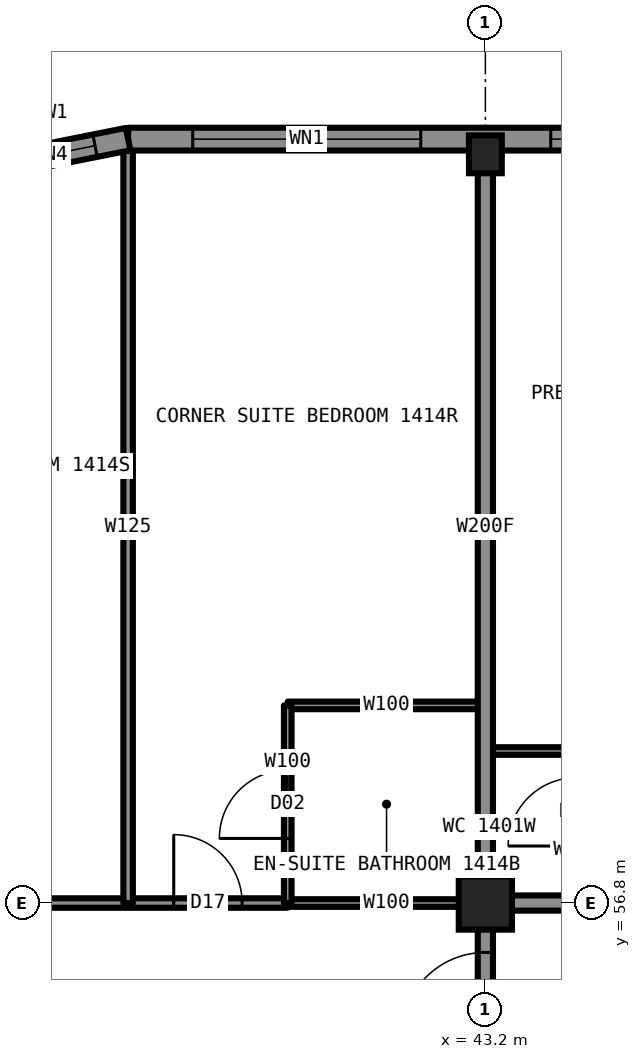
"""IFC4 building model, lengths in metres.
Left out: names, types, materials, properties, quantities, classifications, styles, units other than length and angle.
Written with IfcOpenShell. Run it as: python <this file> out.ifc"""

import sys

from ifc_helpers import new_model, si_unit, direction, frame, frame_2d, origin, origin_2d, place, context, subcontext, project, spatial, rectangle, hollow_rectangle, i_section, extrude, element, fill, save


model = new_model("IFC4")
c1 = context("Model", 3, precision=1e-05, world=origin(), true_north=direction((0.0, 1.0)))
c2 = subcontext(c1, "Body", "Model", "MODEL_VIEW")
j1 = project(units=[si_unit("LENGTHUNIT", "METRE"), si_unit("PLANEANGLEUNIT", "RADIAN")], contexts=[c1])
p1 = place(None, origin())
s1 = spatial("IfcSite", under=j1, at=p1, CompositionType="ELEMENT")
p2 = place(p1, origin())
s2 = spatial("IfcBuilding", under=s1, at=p2, CompositionType="ELEMENT")
p3 = place(p2, frame((0.0, 0.0, 49.5)))
s3 = spatial("IfcBuildingStorey", under=s2, at=p3, CompositionType="ELEMENT", Elevation=49.5)
p4 = place(p3, frame((43.2, 66.65, 0.0), z_axis=(0.0, 0.0, 1.0), x_axis=(1.0, 0.0, 0.0)))
e1 = element("IfcColumn", 1, at=p4, inside=s3, PredefinedType="COLUMN", context=c2, shape_type="SweptSolid", body=[
    extrude(i_section(OverallWidth=0.432, OverallDepth=0.498, WebThickness=0.056, FlangeThickness=0.089, at=origin_2d()), origin(), (0.0, 0.0, 1.0), 3.5),
])
p5 = place(p3, frame((43.2, 56.8, 0.0), z_axis=(0.0, 0.0, 1.0), x_axis=(1.0, 0.0, 0.0)))
e2 = element("IfcColumn", 2, at=p5, inside=s3, PredefinedType="COLUMN", context=c2, shape_type="SweptSolid", body=[
    extrude(hollow_rectangle(XDim=0.7, YDim=0.7, WallThickness=0.06, at=origin_2d()), origin(), (0.0, 0.0, 1.0), 3.5),
])
p6 = place(p3, frame((40.6, 56.8, 0.0), z_axis=(0.0, 0.0, 1.0), x_axis=(1.0, 0.0, 0.0)))
e3 = element("IfcWall", 3, at=p6, inside=s3, PredefinedType="PARTITIONING", context=c2, shape_type="SweptSolid", body=[
    extrude(rectangle(XDim=2.6, YDim=0.1, at=frame_2d((1.3, 0.0))), origin(), (0.0, 0.0, 1.0), 2.573),
])
p7 = place(p3, frame((43.2, 56.8, 0.0), z_axis=(0.0, 0.0, 1.0), x_axis=(1.0, 0.0, 0.0)))
e4 = element("IfcWall", 4, at=p7, inside=s3, PredefinedType="PARTITIONING", context=c2, shape_type="SweptSolid", body=[
    extrude(rectangle(XDim=23.6, YDim=0.2, at=frame_2d((11.8, 0.0))), origin(), (0.0, 0.0, 1.0), 3.33),
])
p8 = place(p7, frame((1.46, 0.0, 0.0)))
e5 = element("IfcOpeningElement", 5, at=p8, cuts=e4, PredefinedType="OPENING", context=c2, shape_type="SweptSolid", body=[
    extrude(rectangle(XDim=1.0, YDim=2.2, at=frame_2d((0.5, 1.1))), frame((0.0, 0.11, 0.0), z_axis=(0.0, -1.0, 0.0), x_axis=(1.0, 0.0, 0.0)), (0.0, 0.0, 1.0), 0.22),
])
p9 = place(p7, frame((7.27, 0.0, 0.0)))
e6 = element("IfcOpeningElement", 6, at=p9, cuts=e4, PredefinedType="OPENING", context=c2, shape_type="SweptSolid", body=[
    extrude(rectangle(XDim=1.0, YDim=2.2, at=frame_2d((0.5, 1.1))), frame((0.0, 0.11, 0.0), z_axis=(0.0, -1.0, 0.0), x_axis=(1.0, 0.0, 0.0)), (0.0, 0.0, 1.0), 0.22),
])
p10 = place(p7, frame((11.7, 0.0, 0.0)))
e7 = element("IfcOpeningElement", 7, at=p10, cuts=e4, PredefinedType="OPENING", context=c2, shape_type="SweptSolid", body=[
    extrude(rectangle(XDim=1.0, YDim=2.2, at=frame_2d((0.5, 1.1))), frame((0.0, 0.11, 0.0), z_axis=(0.0, -1.0, 0.0), x_axis=(1.0, 0.0, 0.0)), (0.0, 0.0, 1.0), 0.22),
])
p11 = place(p7, frame((17.16, 0.0, 0.0)))
e8 = element("IfcOpeningElement", 8, at=p11, cuts=e4, PredefinedType="OPENING", context=c2, shape_type="SweptSolid", body=[
    extrude(rectangle(XDim=1.0, YDim=2.2, at=frame_2d((0.5, 1.1))), frame((0.0, 0.11, 0.0), z_axis=(0.0, -1.0, 0.0), x_axis=(1.0, 0.0, 0.0)), (0.0, 0.0, 1.0), 0.22),
])
p12 = place(p3, frame((33.3, 56.8, 0.0), z_axis=(0.0, 0.0, 1.0), x_axis=(1.0, 0.0, 0.0)))
e9 = element("IfcWall", 9, at=p12, inside=s3, PredefinedType="PARTITIONING", context=c2, shape_type="SweptSolid", body=[
    extrude(rectangle(XDim=7.3, YDim=0.125, at=frame_2d((3.65, 0.0))), origin(), (0.0, 0.0, 1.0), 2.573),
])
p13 = place(p12, frame((5.8, 0.0, 0.0)))
e10 = element("IfcOpeningElement", 10, at=p13, cuts=e9, PredefinedType="OPENING", context=c2, shape_type="SweptSolid", body=[
    extrude(rectangle(XDim=0.9, YDim=2.2, at=frame_2d((0.45, 1.1))), frame((0.0, 0.073, 0.0), z_axis=(0.0, -1.0, 0.0), x_axis=(1.0, 0.0, 0.0)), (0.0, 0.0, 1.0), 0.145),
])
p14 = place(p12, frame((2.0, 0.0, 0.0)))
e11 = element("IfcOpeningElement", 11, at=p14, cuts=e9, PredefinedType="OPENING", context=c2, shape_type="SweptSolid", body=[
    extrude(rectangle(XDim=0.9, YDim=2.2, at=frame_2d((0.45, 1.1))), frame((0.0, 0.073, 0.0), z_axis=(0.0, -1.0, 0.0), x_axis=(1.0, 0.0, 0.0)), (0.0, 0.0, 1.0), 0.145),
])
p15 = place(p3, frame((43.2, 58.8, 0.0), z_axis=(0.0, 0.0, 1.0), x_axis=(1.0, 0.0, 0.0)))
e12 = element("IfcWall", 12, at=p15, inside=s3, PredefinedType="PARTITIONING", context=c2, shape_type="SweptSolid", body=[
    extrude(rectangle(XDim=1.2, YDim=0.1, at=frame_2d((0.6, 0.0))), origin(), (0.0, 0.0, 1.0), 3.33),
])
p16 = place(p3, frame((40.6, 59.4, 0.0), z_axis=(0.0, 0.0, 1.0), x_axis=(1.0, 0.0, 0.0)))
e13 = element("IfcWall", 13, at=p16, inside=s3, PredefinedType="PARTITIONING", context=c2, shape_type="SweptSolid", body=[
    extrude(rectangle(XDim=2.6, YDim=0.1, at=frame_2d((1.3, 0.0))), origin(), (0.0, 0.0, 1.0), 3.33),
])
p17 = place(p3, frame((43.2, 52.08, 0.0), z_axis=(0.0, 0.0, 1.0), x_axis=(0.0, 1.0, 0.0)))
e14 = element("IfcWall", 14, at=p17, inside=s3, PredefinedType="PARTITIONING", context=c2, shape_type="SweptSolid", body=[
    extrude(rectangle(XDim=4.72, YDim=0.2, at=frame_2d((2.36, 0.0))), origin(), (0.0, 0.0, 1.0), 3.33),
])
p18 = place(p17, frame((2.97, 0.0, 0.0)))
e15 = element("IfcOpeningElement", 15, at=p18, cuts=e14, PredefinedType="OPENING", context=c2, shape_type="SweptSolid", body=[
    extrude(rectangle(XDim=1.1, YDim=2.2, at=frame_2d((0.55, 1.1))), frame((0.0, 0.11, 0.0), z_axis=(0.0, -1.0, 0.0), x_axis=(1.0, 0.0, 0.0)), (0.0, 0.0, 1.0), 0.22),
])
p19 = place(p3, frame((43.2, 56.8, 0.0), z_axis=(0.0, 0.0, 1.0), x_axis=(0.0, 1.0, 0.0)))
e16 = element("IfcWall", 16, at=p19, inside=s3, PredefinedType="PARTITIONING", context=c2, shape_type="SweptSolid", body=[
    extrude(rectangle(XDim=9.9, YDim=0.2, at=frame_2d((4.95, 0.0))), origin(), (0.0, 0.0, 1.0), 2.573),
])
p20 = place(p3, frame((40.6, 56.8, 0.0), z_axis=(0.0, 0.0, 1.0), x_axis=(0.0, 1.0, 0.0)))
e17 = element("IfcWall", 17, at=p20, inside=s3, PredefinedType="PARTITIONING", context=c2, shape_type="SweptSolid", body=[
    extrude(rectangle(XDim=2.6, YDim=0.1, at=frame_2d((1.3, 0.0))), origin(), (0.0, 0.0, 1.0), 3.33),
])
p21 = place(p20, frame((0.85, 0.0, 0.0)))
e18 = element("IfcOpeningElement", 18, at=p21, cuts=e17, PredefinedType="OPENING", context=c2, shape_type="SweptSolid", body=[
    extrude(rectangle(XDim=0.9, YDim=2.1, at=frame_2d((0.45, 1.05))), frame((0.0, 0.06, 0.0), z_axis=(0.0, -1.0, 0.0), x_axis=(1.0, 0.0, 0.0)), (0.0, 0.0, 1.0), 0.12),
])
p22 = place(p3, frame((38.5, 56.8, 0.0), z_axis=(0.0, 0.0, 1.0), x_axis=(0.0, 1.0, 0.0)))
e19 = element("IfcWall", 19, at=p22, inside=s3, PredefinedType="PARTITIONING", context=c2, shape_type="SweptSolid", body=[
    extrude(rectangle(XDim=9.894, YDim=0.125, at=frame_2d((4.947, 0.0))), origin(), (0.0, 0.0, 1.0), 3.33),
])
p23 = place(p3, frame((71.5, 66.85, 0.0), z_axis=(0.0, 0.0, 1.0), x_axis=(-1.0, 0.0, 0.0)))
e20 = element("IfcWall", 20, at=p23, inside=s3, PredefinedType="SOLIDWALL", context=c2, shape_type="SweptSolid", body=[
    extrude(rectangle(XDim=33.0, YDim=0.3, at=frame_2d((16.5, 0.0))), origin(), (0.0, 0.0, 1.0), 2.83),
])
p24 = place(p23, frame((0.85, 0.0, 0.5)))
e21 = element("IfcOpeningElement", 21, at=p24, cuts=e20, PredefinedType="OPENING", context=c2, shape_type="SweptSolid", body=[
    extrude(rectangle(XDim=3.0, YDim=2.0, at=frame_2d((1.5, 1.0))), frame((0.0, 0.16, 0.0), z_axis=(0.0, -1.0, 0.0), x_axis=(1.0, 0.0, 0.0)), (0.0, 0.0, 1.0), 0.32),
])
p25 = place(p23, frame((5.56, 0.0, 0.5)))
e22 = element("IfcOpeningElement", 22, at=p25, cuts=e20, PredefinedType="OPENING", context=c2, shape_type="SweptSolid", body=[
    extrude(rectangle(XDim=3.0, YDim=2.0, at=frame_2d((1.5, 1.0))), frame((0.0, 0.16, 0.0), z_axis=(0.0, -1.0, 0.0), x_axis=(1.0, 0.0, 0.0)), (0.0, 0.0, 1.0), 0.32),
])
p26 = place(p23, frame((10.28, 0.0, 1.1)))
e23 = element("IfcOpeningElement", 23, at=p26, cuts=e20, PredefinedType="OPENING", context=c2, shape_type="SweptSolid", body=[
    extrude(rectangle(XDim=1.1, YDim=1.4, at=frame_2d((0.55, 0.7))), frame((0.0, 0.16, 0.0), z_axis=(0.0, -1.0, 0.0), x_axis=(1.0, 0.0, 0.0)), (0.0, 0.0, 1.0), 0.32),
])
p27 = place(p23, frame((15.0, 0.0, 0.5)))
e24 = element("IfcOpeningElement", 24, at=p27, cuts=e20, PredefinedType="OPENING", context=c2, shape_type="SweptSolid", body=[
    extrude(rectangle(XDim=3.0, YDim=2.0, at=frame_2d((1.5, 1.0))), frame((0.0, 0.16, 0.0), z_axis=(0.0, -1.0, 0.0), x_axis=(1.0, 0.0, 0.0)), (0.0, 0.0, 1.0), 0.32),
])
p28 = place(p23, frame((21.62, 0.0, 1.1)))
e25 = element("IfcOpeningElement", 25, at=p28, cuts=e20, PredefinedType="OPENING", context=c2, shape_type="SweptSolid", body=[
    extrude(rectangle(XDim=1.1, YDim=1.4, at=frame_2d((0.55, 0.7))), frame((0.0, 0.16, 0.0), z_axis=(0.0, -1.0, 0.0), x_axis=(1.0, 0.0, 0.0)), (0.0, 0.0, 1.0), 0.32),
])
p29 = place(p23, frame((24.44, 0.0, 0.5)))
e26 = element("IfcOpeningElement", 26, at=p29, cuts=e20, PredefinedType="OPENING", context=c2, shape_type="SweptSolid", body=[
    extrude(rectangle(XDim=3.0, YDim=2.0, at=frame_2d((1.5, 1.0))), frame((0.0, 0.16, 0.0), z_axis=(0.0, -1.0, 0.0), x_axis=(1.0, 0.0, 0.0)), (0.0, 0.0, 1.0), 0.32),
])
p30 = place(p23, frame((29.15, 0.0, 0.5)))
e27 = element("IfcOpeningElement", 27, at=p30, cuts=e20, PredefinedType="OPENING", context=c2, shape_type="SweptSolid", body=[
    extrude(rectangle(XDim=3.0, YDim=2.0, at=frame_2d((1.5, 1.0))), frame((0.0, 0.16, 0.0), z_axis=(0.0, -1.0, 0.0), x_axis=(1.0, 0.0, 0.0)), (0.0, 0.0, 1.0), 0.32),
])
p31 = place(p3, frame((38.5, 66.85, 0.0), z_axis=(0.0, 0.0, 1.0), x_axis=(-0.980787050784, -0.195081421501, 0.0)))
e28 = element("IfcWall", 28, at=p31, inside=s3, PredefinedType="SOLIDWALL", context=c2, shape_type="SweptSolid", body=[
    extrude(rectangle(XDim=2.087, YDim=0.3, at=frame_2d((1.044, 0.0))), origin(), (0.0, 0.0, 1.0), 3.33),
])
p32 = place(p31, frame((0.444, 0.0, 0.5)))
e29 = element("IfcOpeningElement", 29, at=p32, cuts=e28, PredefinedType="OPENING", context=c2, shape_type="SweptSolid", body=[
    extrude(rectangle(XDim=1.2, YDim=2.0, at=frame_2d((0.6, 1.0))), frame((0.0, 0.16, 0.0), z_axis=(0.0, -1.0, 0.0), x_axis=(1.0, 0.0, 0.0)), (0.0, 0.0, 1.0), 0.32),
])
p33 = place(p18, origin())
e30 = element("IfcDoor", 30, at=p33, inside=s3, OperationType="SINGLE_SWING_LEFT", PredefinedType="DOOR", context=c2, shape_type="SweptSolid", body=[
    extrude(rectangle(XDim=1.1, YDim=2.2, at=frame_2d((0.55, 1.1))), frame((0.0, 0.025, 0.0), z_axis=(0.0, -1.0, 0.0), x_axis=(1.0, 0.0, 0.0)), (0.0, 0.0, 1.0), 0.05),
])
fill(e15, e30)
p34 = place(p21, origin())
e31 = element("IfcDoor", 31, at=p34, inside=s3, OperationType="SINGLE_SWING_RIGHT", PredefinedType="DOOR", context=c2, shape_type="SweptSolid", body=[
    extrude(rectangle(XDim=0.9, YDim=2.1, at=frame_2d((0.45, 1.05))), frame((0.0, 0.025, 0.0), z_axis=(0.0, -1.0, 0.0), x_axis=(1.0, 0.0, 0.0)), (0.0, 0.0, 1.0), 0.05),
])
fill(e18, e31)
p35 = place(p13, origin())
e32 = element("IfcDoor", 32, at=p35, inside=s3, OperationType="SINGLE_SWING_LEFT", PredefinedType="DOOR", context=c2, shape_type="SweptSolid", body=[
    extrude(rectangle(XDim=0.9, YDim=2.2, at=frame_2d((0.45, 1.1))), frame((0.0, 0.025, 0.0), z_axis=(0.0, -1.0, 0.0), x_axis=(1.0, 0.0, 0.0)), (0.0, 0.0, 1.0), 0.05),
])
fill(e10, e32)
p36 = place(p29, origin())
e33 = element("IfcWindow", 33, at=p36, inside=s3, PartitioningType="SINGLE_PANEL", PredefinedType="WINDOW", context=c2, shape_type="SweptSolid", body=[
    extrude(rectangle(XDim=3.0, YDim=2.0, at=frame_2d((1.5, 1.0))), frame((0.0, 0.03, 0.0), z_axis=(0.0, -1.0, 0.0), x_axis=(1.0, 0.0, 0.0)), (0.0, 0.0, 1.0), 0.06),
])
fill(e26, e33)
p37 = place(p30, origin())
e34 = element("IfcWindow", 34, at=p37, inside=s3, PartitioningType="SINGLE_PANEL", PredefinedType="WINDOW", context=c2, shape_type="SweptSolid", body=[
    extrude(rectangle(XDim=3.0, YDim=2.0, at=frame_2d((1.5, 1.0))), frame((0.0, 0.03, 0.0), z_axis=(0.0, -1.0, 0.0), x_axis=(1.0, 0.0, 0.0)), (0.0, 0.0, 1.0), 0.06),
])
fill(e27, e34)
p38 = place(p32, origin())
e35 = element("IfcWindow", 35, at=p38, inside=s3, PartitioningType="SINGLE_PANEL", PredefinedType="WINDOW", context=c2, shape_type="SweptSolid", body=[
    extrude(rectangle(XDim=1.2, YDim=2.0, at=frame_2d((0.6, 1.0))), frame((0.0, 0.03, 0.0), z_axis=(0.0, -1.0, 0.0), x_axis=(1.0, 0.0, 0.0)), (0.0, 0.0, 1.0), 0.06),
])
fill(e29, e35)
save(model, sys.argv[1])
